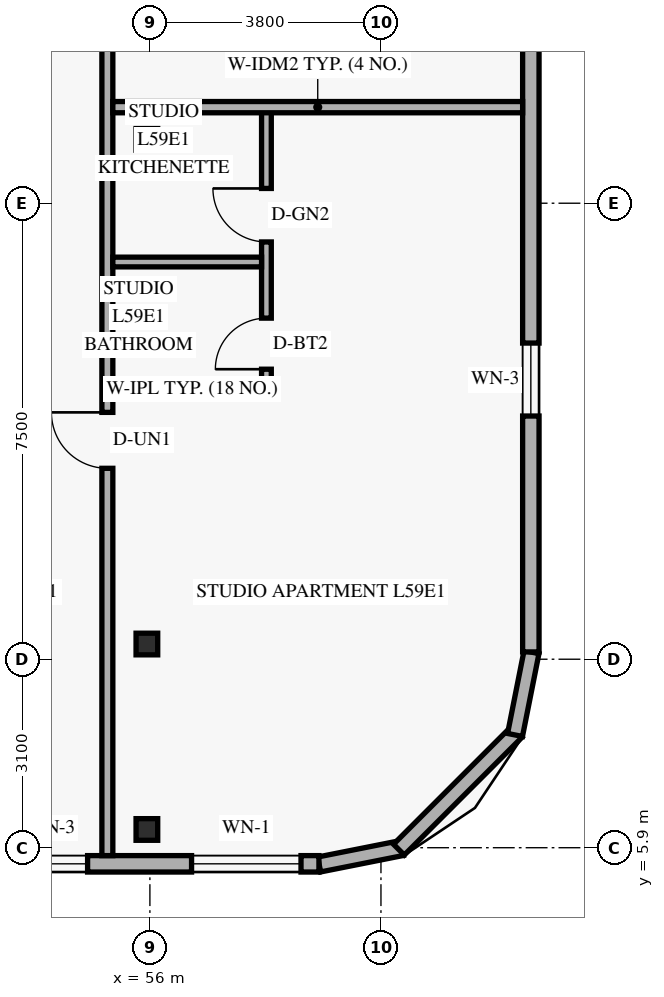
"""IFC4 building model, lengths in metres.
Left out: names, types, materials, properties, quantities, classifications, styles, units other than length and angle.
Written with IfcOpenShell. Run it as: python <this file> out.ifc"""

import sys

from ifc_helpers import new_model, si_unit, direction, frame, frame_2d, origin, origin_2d, place, context, subcontext, project, spatial, rectangle, hollow_rectangle, extrude, element, fill, save


model = new_model("IFC4")
c1 = context("Model", 3, precision=1e-05, world=origin(), true_north=direction((0.0, 1.0)))
c2 = subcontext(c1, "Body", "Model", "MODEL_VIEW")
j1 = project(units=[si_unit("LENGTHUNIT", "METRE"), si_unit("PLANEANGLEUNIT", "RADIAN")], contexts=[c1])
p1 = place(None, origin())
s1 = spatial("IfcSite", under=j1, at=p1, CompositionType="ELEMENT")
p2 = place(p1, origin())
s2 = spatial("IfcBuilding", under=s1, at=p2, CompositionType="ELEMENT")
p3 = place(p2, frame((0.0, 0.0, 227.4)))
s3 = spatial("IfcBuildingStorey", under=s2, at=p3, CompositionType="ELEMENT", Elevation=227.4)
for number, where, z_axis, x_axis in (
    (1, (55.846, 6.2, 0.0), (0.058, 0.0, 0.998), (0.0, 1.0, 0.0)),
    (2, (55.846, 9.25, 0.0), (0.058, 0.0, 0.998), (0.0, 1.0, 0.0)),
    (3, (55.846, 17.55, 0.0), (0.058, 0.0, 0.998), (0.0, 1.0, 0.0)),
):
    element("IfcColumn", number, at=place(p3, frame(where, z_axis=z_axis, x_axis=x_axis)), inside=s3, PredefinedType="COLUMN", context=c2, shape_type="SweptSolid", body=[
        extrude(hollow_rectangle(XDim=0.356, YDim=0.356, WallThickness=0.016, at=origin_2d()), origin(), (0.0, 0.0, 1.0), 3.606),
    ])
p4 = place(p3, frame((58.783, 5.624, 0.0), z_axis=(0.0, 0.0, 1.0), x_axis=(0.980809899341, 0.19496651342, 0.0)))
e4 = element("IfcWall", 4, at=p4, inside=s3, PredefinedType="SOLIDWALL", context=c2, shape_type="SweptSolid", body=[
    extrude(rectangle(XDim=1.389, YDim=0.25, at=frame_2d((0.694, 0.0))), origin(), (0.0, 0.0, 1.0), 3.35),
])
p5 = place(p3, frame((60.095, 5.868, 0.0), z_axis=(0.0, 0.0, 1.0), x_axis=(0.707106781187, 0.707106781187, 0.0)))
e5 = element("IfcWall", 5, at=p5, inside=s3, PredefinedType="SOLIDWALL", context=c2, shape_type="SweptSolid", body=[
    extrude(rectangle(XDim=2.739, YDim=0.25, at=frame_2d((1.37, 0.0))), origin(), (0.0, 0.0, 1.0), 3.35),
])
p6 = place(p3, frame((62.005, 7.754, 0.0), z_axis=(0.0, 0.0, 1.0), x_axis=(0.195135625965, 0.9807762678, 0.0)))
e6 = element("IfcWall", 6, at=p6, inside=s3, PredefinedType="SOLIDWALL", context=c2, shape_type="SweptSolid", body=[
    extrude(rectangle(XDim=1.389, YDim=0.25, at=frame_2d((0.694, 0.0))), origin(), (0.0, 0.0, 1.0), 3.35),
])
p7 = place(p3, frame((25.82, 5.635, 0.0), z_axis=(0.0, 0.0, 1.0), x_axis=(1.0, 0.0, 0.0)))
e7 = element("IfcWall", 7, at=p7, inside=s3, PredefinedType="SOLIDWALL", context=c2, shape_type="SweptSolid", body=[
    extrude(rectangle(XDim=32.96, YDim=0.27, at=frame_2d((16.48, 0.0))), origin(), (0.0, 0.0, 1.0), 3.35),
])
p8 = place(p7, frame((3.57, 0.0, 0.85)))
e8 = element("IfcOpeningElement", 8, at=p8, cuts=e7, PredefinedType="OPENING", context=c2, shape_type="SweptSolid", body=[
    extrude(rectangle(XDim=1.8, YDim=1.6, at=frame_2d((0.9, 0.8))), frame((0.0, 0.145, 0.0), z_axis=(0.0, -1.0, 0.0), x_axis=(1.0, 0.0, 0.0)), (0.0, 0.0, 1.0), 0.29),
])
p9 = place(p7, frame((16.214, 0.0, 0.85)))
e9 = element("IfcOpeningElement", 9, at=p9, cuts=e7, PredefinedType="OPENING", context=c2, shape_type="SweptSolid", body=[
    extrude(rectangle(XDim=1.8, YDim=1.6, at=frame_2d((0.9, 0.8))), frame((0.0, 0.145, 0.0), z_axis=(0.0, -1.0, 0.0), x_axis=(1.0, 0.0, 0.0)), (0.0, 0.0, 1.0), 0.29),
])
p10 = place(p7, frame((27.955, 0.0, 0.85)))
e10 = element("IfcOpeningElement", 10, at=p10, cuts=e7, PredefinedType="OPENING", context=c2, shape_type="SweptSolid", body=[
    extrude(rectangle(XDim=1.2, YDim=1.5, at=frame_2d((0.6, 0.75))), frame((0.0, 0.145, 0.0), z_axis=(0.0, -1.0, 0.0), x_axis=(1.0, 0.0, 0.0)), (0.0, 0.0, 1.0), 0.29),
])
p11 = place(p7, frame((30.865, 0.0, 0.85)))
e11 = element("IfcOpeningElement", 11, at=p11, cuts=e7, PredefinedType="OPENING", context=c2, shape_type="SweptSolid", body=[
    extrude(rectangle(XDim=1.8, YDim=1.6, at=frame_2d((0.9, 0.8))), frame((0.0, 0.145, 0.0), z_axis=(0.0, -1.0, 0.0), x_axis=(1.0, 0.0, 0.0)), (0.0, 0.0, 1.0), 0.29),
])
p12 = place(p3, frame((62.265, 9.12, 0.0), z_axis=(0.0, 0.0, 1.0), x_axis=(0.0, 1.0, 0.0)))
e12 = element("IfcWall", 12, at=p12, inside=s3, PredefinedType="SOLIDWALL", context=c2, shape_type="SweptSolid", body=[
    extrude(rectangle(XDim=29.76, YDim=0.27, at=frame_2d((14.88, 0.0))), origin(), (0.0, 0.0, 1.0), 3.35),
])
p13 = place(p12, frame((3.88, 0.0, 0.85)))
e13 = element("IfcOpeningElement", 13, at=p13, cuts=e12, PredefinedType="OPENING", context=c2, shape_type="SweptSolid", body=[
    extrude(rectangle(XDim=1.2, YDim=1.5, at=frame_2d((0.6, 0.75))), frame((0.0, 0.145, 0.0), z_axis=(0.0, -1.0, 0.0), x_axis=(1.0, 0.0, 0.0)), (0.0, 0.0, 1.0), 0.29),
])
p14 = place(p12, frame((12.83, 0.0, 0.85)))
e14 = element("IfcOpeningElement", 14, at=p14, cuts=e12, PredefinedType="OPENING", context=c2, shape_type="SweptSolid", body=[
    extrude(rectangle(XDim=1.2, YDim=1.5, at=frame_2d((0.6, 0.75))), frame((0.0, 0.145, 0.0), z_axis=(0.0, -1.0, 0.0), x_axis=(1.0, 0.0, 0.0)), (0.0, 0.0, 1.0), 0.29),
])
p15 = place(p12, frame((19.12, 0.0, 0.85)))
e15 = element("IfcOpeningElement", 15, at=p15, cuts=e12, PredefinedType="OPENING", context=c2, shape_type="SweptSolid", body=[
    extrude(rectangle(XDim=1.2, YDim=1.5, at=frame_2d((0.6, 0.75))), frame((0.0, 0.145, 0.0), z_axis=(0.0, -1.0, 0.0), x_axis=(1.0, 0.0, 0.0)), (0.0, 0.0, 1.0), 0.29),
])
p16 = place(p12, frame((25.05, 0.0, 0.85)))
e16 = element("IfcOpeningElement", 16, at=p16, cuts=e12, PredefinedType="OPENING", context=c2, shape_type="SweptSolid", body=[
    extrude(rectangle(XDim=1.2, YDim=1.5, at=frame_2d((0.6, 0.75))), frame((0.0, 0.145, 0.0), z_axis=(0.0, -1.0, 0.0), x_axis=(1.0, 0.0, 0.0)), (0.0, 0.0, 1.0), 0.29),
])
p17 = place(p3, frame((55.3, 5.77, 0.0), z_axis=(0.0, 0.0, 1.0), x_axis=(0.0, 1.0, 0.0)))
e17 = element("IfcWall", 17, at=p17, inside=s3, PredefinedType="STANDARD", context=c2, shape_type="SweptSolid", body=[
    extrude(rectangle(XDim=36.46, YDim=0.18, at=frame_2d((18.23, 0.0))), origin(), (0.0, 0.0, 1.0), 2.793),
])
p18 = place(p17, frame((6.37, 0.0, 0.0)))
e18 = element("IfcOpeningElement", 18, at=p18, cuts=e17, PredefinedType="OPENING", context=c2, shape_type="SweptSolid", body=[
    extrude(rectangle(XDim=0.92, YDim=2.15, at=frame_2d((0.46, 1.075))), frame((0.0, 0.1, 0.0), z_axis=(0.0, -1.0, 0.0), x_axis=(1.0, 0.0, 0.0)), (0.0, 0.0, 1.0), 0.2),
])
p19 = place(p17, frame((15.243, 0.0, 0.0)))
e19 = element("IfcOpeningElement", 19, at=p19, cuts=e17, PredefinedType="OPENING", context=c2, shape_type="SweptSolid", body=[
    extrude(rectangle(XDim=0.92, YDim=2.15, at=frame_2d((0.46, 1.075))), frame((0.0, 0.1, 0.0), z_axis=(0.0, -1.0, 0.0), x_axis=(1.0, 0.0, 0.0)), (0.0, 0.0, 1.0), 0.2),
])
p20 = place(p17, frame((26.905, 0.0, 0.0)))
e20 = element("IfcOpeningElement", 20, at=p20, cuts=e17, PredefinedType="OPENING", context=c2, shape_type="SweptSolid", body=[
    extrude(rectangle(XDim=0.92, YDim=2.15, at=frame_2d((0.46, 1.075))), frame((0.0, 0.1, 0.0), z_axis=(0.0, -1.0, 0.0), x_axis=(1.0, 0.0, 0.0)), (0.0, 0.0, 1.0), 0.2),
])
p21 = place(p3, frame((55.39, 13.44, 0.0), z_axis=(0.0, 0.0, 1.0), x_axis=(1.0, 0.0, 0.0)))
e21 = element("IfcWall", 21, at=p21, inside=s3, PredefinedType="PLUMBINGWALL", context=c2, shape_type="SweptSolid", body=[
    extrude(rectangle(XDim=2.606, YDim=0.16, at=frame_2d((1.303, 0.0))), origin(), (0.0, 0.0, 1.0), 2.793),
])
p22 = place(p3, frame((57.917, 13.35, 0.0), z_axis=(0.0, 0.0, 1.0), x_axis=(0.0, 1.0, 0.0)))
e22 = element("IfcWall", 22, at=p22, inside=s3, PredefinedType="PLUMBINGWALL", context=c2, shape_type="SweptSolid", body=[
    extrude(rectangle(XDim=4.73, YDim=0.16, at=frame_2d((2.365, 0.0))), origin(), (0.0, 0.0, 1.0), 3.35),
])
p23 = place(p22, frame((0.42, 0.0, 0.0)))
e23 = element("IfcOpeningElement", 23, at=p23, cuts=e22, PredefinedType="OPENING", context=c2, shape_type="SweptSolid", body=[
    extrude(rectangle(XDim=0.84, YDim=2.12, at=frame_2d((0.42, 1.06))), frame((0.0, 0.09, 0.0), z_axis=(0.0, -1.0, 0.0), x_axis=(1.0, 0.0, 0.0)), (0.0, 0.0, 1.0), 0.18),
])
p24 = place(p22, frame((2.513, 0.0, 0.0)))
e24 = element("IfcOpeningElement", 24, at=p24, cuts=e22, PredefinedType="OPENING", context=c2, shape_type="SweptSolid", body=[
    extrude(rectangle(XDim=0.88, YDim=2.12, at=frame_2d((0.44, 1.06))), frame((0.0, 0.09, 0.0), z_axis=(0.0, -1.0, 0.0), x_axis=(1.0, 0.0, 0.0)), (0.0, 0.0, 1.0), 0.18),
])
p25 = place(p3, frame((55.39, 15.533, 0.0), z_axis=(0.0, 0.0, 1.0), x_axis=(1.0, 0.0, 0.0)))
e25 = element("IfcWall", 25, at=p25, inside=s3, PredefinedType="PLUMBINGWALL", context=c2, shape_type="SweptSolid", body=[
    extrude(rectangle(XDim=2.446, YDim=0.16, at=frame_2d((1.223, 0.0))), origin(), (0.0, 0.0, 1.0), 2.793),
])
p26 = place(p3, frame((55.39, 18.08, 0.0), z_axis=(0.0, 0.0, 1.0), x_axis=(1.0, 0.0, 0.0)))
e26 = element("IfcWall", 26, at=p26, inside=s3, PredefinedType="PARTITIONING", context=c2, shape_type="SweptSolid", body=[
    extrude(rectangle(XDim=6.74, YDim=0.185, at=frame_2d((3.37, 0.0))), origin(), (0.0, 0.0, 1.0), 2.793),
])
p27 = place(p10, origin())
e27 = element("IfcWindow", 27, at=p27, inside=s3, PartitioningType="SINGLE_PANEL", PredefinedType="WINDOW", context=c2, shape_type="SweptSolid", body=[
    extrude(rectangle(XDim=1.2, YDim=1.5, at=frame_2d((0.6, 0.75))), frame((0.0, 0.03, 0.0), z_axis=(0.0, -1.0, 0.0), x_axis=(1.0, 0.0, 0.0)), (0.0, 0.0, 1.0), 0.06),
])
fill(e10, e27)
p28 = place(p11, origin())
e28 = element("IfcWindow", 28, at=p28, inside=s3, PartitioningType="SINGLE_PANEL", PredefinedType="WINDOW", context=c2, shape_type="SweptSolid", body=[
    extrude(rectangle(XDim=1.8, YDim=1.6, at=frame_2d((0.9, 0.8))), frame((0.0, 0.03, 0.0), z_axis=(0.0, -1.0, 0.0), x_axis=(1.0, 0.0, 0.0)), (0.0, 0.0, 1.0), 0.06),
])
fill(e11, e28)
p29 = place(p13, origin())
e29 = element("IfcWindow", 29, at=p29, inside=s3, PartitioningType="SINGLE_PANEL", PredefinedType="WINDOW", context=c2, shape_type="SweptSolid", body=[
    extrude(rectangle(XDim=1.2, YDim=1.5, at=frame_2d((0.6, 0.75))), frame((0.0, 0.03, 0.0), z_axis=(0.0, -1.0, 0.0), x_axis=(1.0, 0.0, 0.0)), (0.0, 0.0, 1.0), 0.06),
])
fill(e13, e29)
p30 = place(p18, origin())
e30 = element("IfcDoor", 30, at=p30, inside=s3, OperationType="SINGLE_SWING_RIGHT", PredefinedType="DOOR", context=c2, shape_type="SweptSolid", body=[
    extrude(rectangle(XDim=0.92, YDim=2.15, at=frame_2d((0.46, 1.075))), frame((0.0, 0.025, 0.0), z_axis=(0.0, -1.0, 0.0), x_axis=(1.0, 0.0, 0.0)), (0.0, 0.0, 1.0), 0.05),
])
fill(e18, e30)
p31 = place(p23, origin())
e31 = element("IfcDoor", 31, at=p31, inside=s3, OperationType="SINGLE_SWING_LEFT", PredefinedType="DOOR", context=c2, shape_type="SweptSolid", body=[
    extrude(rectangle(XDim=0.84, YDim=2.12, at=frame_2d((0.42, 1.06))), frame((0.0, 0.025, 0.0), z_axis=(0.0, -1.0, 0.0), x_axis=(1.0, 0.0, 0.0)), (0.0, 0.0, 1.0), 0.05),
])
fill(e23, e31)
p32 = place(p24, origin())
e32 = element("IfcDoor", 32, at=p32, inside=s3, OperationType="SINGLE_SWING_RIGHT", PredefinedType="DOOR", context=c2, shape_type="SweptSolid", body=[
    extrude(rectangle(XDim=0.88, YDim=2.12, at=frame_2d((0.44, 1.06))), frame((0.0, 0.025, 0.0), z_axis=(0.0, -1.0, 0.0), x_axis=(1.0, 0.0, 0.0)), (0.0, 0.0, 1.0), 0.05),
])
fill(e24, e32)
save(model, sys.argv[1])
